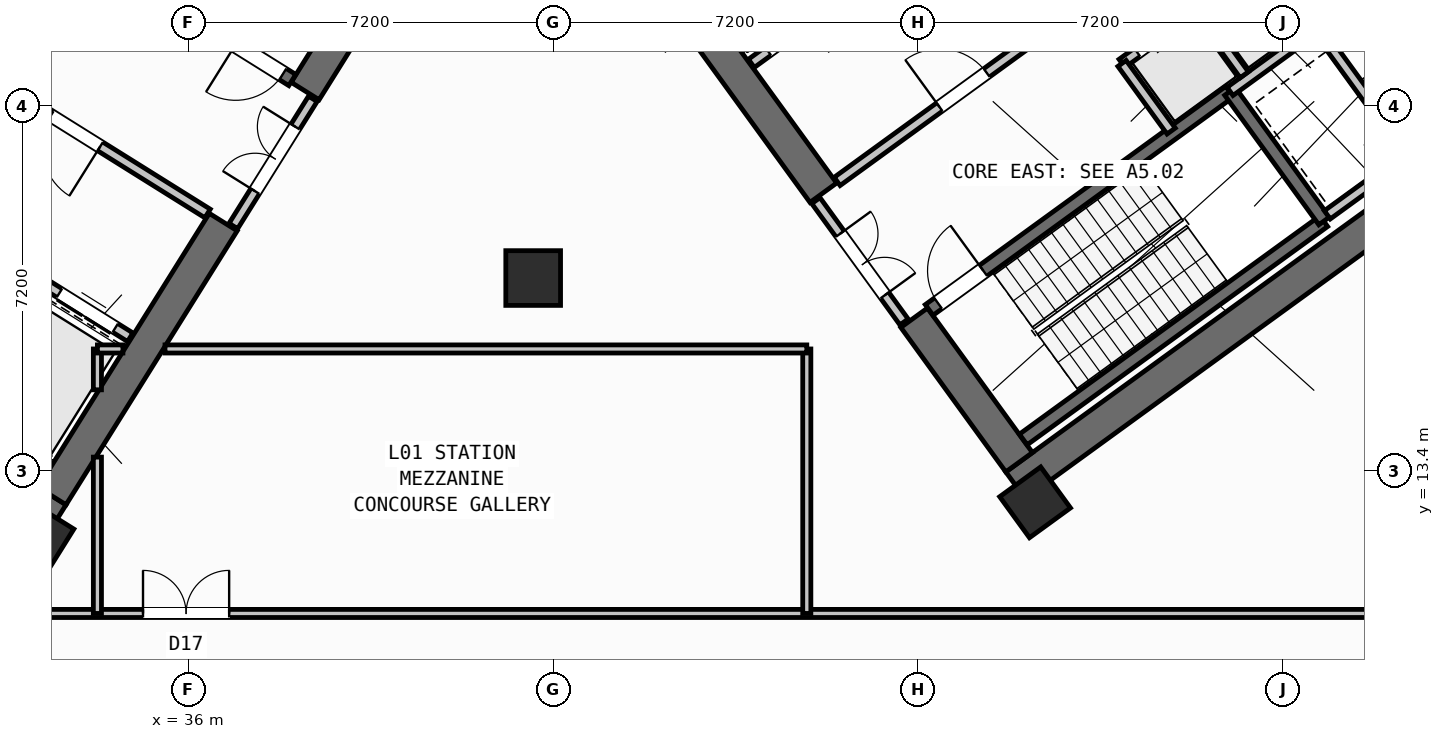
"""IFC4 building model, lengths in metres.
Left out: names, types, materials, properties, quantities, classifications, styles, units other than length and angle.
Written with IfcOpenShell. Run it as: python <this file> out.ifc"""

import sys

from ifc_helpers import new_model, si_unit, direction, frame, frame_2d, origin, origin_2d, place, context, subcontext, project, spatial, rectangle, hollow_rectangle, extrude, source, transform, mapped, element, fill, save


model = new_model("IFC4")
c1 = context("Model", 3, precision=1e-05, world=origin(), true_north=direction((0.0, 1.0)))
c2 = subcontext(c1, "Body", "Model", "MODEL_VIEW")
j1 = project(units=[si_unit("LENGTHUNIT", "METRE"), si_unit("PLANEANGLEUNIT", "RADIAN")], contexts=[c1])
p1 = place(None, origin())
s1 = spatial("IfcSite", under=j1, at=p1, CompositionType="ELEMENT")
p2 = place(p1, origin())
s2 = spatial("IfcBuilding", under=s1, at=p2, CompositionType="ELEMENT")
p3 = place(p2, frame((0.0, 0.0, 5.4)))
s3 = spatial("IfcBuildingStorey", under=s2, at=p3, CompositionType="ELEMENT", Elevation=5.4)
p4 = place(p3, frame((33.409, 12.45, 0.0), z_axis=(0.0, 0.0, 1.0), x_axis=(-0.848051132073, 0.529914405721, 0.0)))
e1 = element("IfcWall", 1, at=p4, inside=s3, PredefinedType="SHEAR", context=c2, shape_type="SweptSolid", body=[
    extrude(rectangle(XDim=13.24, YDim=0.65, at=frame_2d((6.62, 0.0))), origin(), (0.0, 0.0, 1.0), 4.45),
])
p5 = place(p3, frame((40.168, 23.88, 0.0), z_axis=(0.0, 0.0, 1.0), x_axis=(-0.529893103397, -0.8480644427, 0.0)))
e2 = element("IfcWall", 2, at=p5, inside=s3, PredefinedType="SHEAR", context=c2, shape_type="SweptSolid", body=[
    extrude(rectangle(XDim=3.525, YDim=0.65, at=frame_2d((1.763, 0.0))), origin(), (0.0, 0.0, 1.0), 4.45),
])
p6 = place(p3, frame((36.683, 18.304, 0.0), z_axis=(0.0, 0.0, 1.0), x_axis=(-0.529899109053, -0.848060690178, 0.0)))
e3 = element("IfcWall", 3, at=p6, inside=s3, PredefinedType="SHEAR", context=c2, shape_type="SweptSolid", body=[
    extrude(rectangle(XDim=6.375, YDim=0.65, at=frame_2d((3.188, 0.0))), origin(), (0.0, 0.0, 1.0), 4.45),
])
p7 = place(p3, frame((52.318, 13.11, 0.0), z_axis=(0.0, 0.0, 1.0), x_axis=(0.809019445368, 0.587781878776, 0.0)))
e4 = element("IfcWall", 4, at=p7, inside=s3, PredefinedType="SHEAR", context=c2, shape_type="SweptSolid", body=[
    extrude(rectangle(XDim=12.44, YDim=0.65, at=frame_2d((6.22, 0.0))), origin(), (0.0, 0.0, 1.0), 4.45),
])
p8 = place(p3, frame((52.39, 13.564, 0.0), z_axis=(0.0, 0.0, 1.0), x_axis=(-0.58779688989, 0.809008539037, 0.0)))
e5 = element("IfcWall", 5, at=p8, inside=s3, PredefinedType="SHEAR", context=c2, shape_type="SweptSolid", body=[
    extrude(rectangle(XDim=3.525, YDim=0.65, at=frame_2d((1.763, 0.0))), origin(), (0.0, 0.0, 1.0), 4.45),
])
p9 = place(p3, frame((48.526, 18.884, 0.0), z_axis=(0.0, 0.0, 1.0), x_axis=(-0.58777996584, 0.809020835181, 0.0)))
e6 = element("IfcWall", 6, at=p9, inside=s3, PredefinedType="SHEAR", context=c2, shape_type="SweptSolid", body=[
    extrude(rectangle(XDim=6.375, YDim=0.65, at=frame_2d((3.188, 0.0))), origin(), (0.0, 0.0, 1.0), 4.45),
])
m1 = source(origin(), c2, "Body", "SweptSolid", [
    extrude(hollow_rectangle(XDim=1.08, YDim=1.08, WallThickness=0.04, at=origin_2d()), origin(), (0.0, 0.0, 1.0), 4.8),
])
p10 = place(p3, frame((42.8, 17.2, 0.0), z_axis=(0.0, 0.0, 1.0), x_axis=(1.0, 0.0, 0.0)))
e7 = element("IfcColumn", 7, at=p10, inside=s3, PredefinedType="COLUMN", context=c2, shape_type="MappedRepresentation", body=[
    mapped(m1, transform((0.0, 0.0, 0.0), scale=1.0)),
])
m2 = source(origin(), c2, "Body", "SweptSolid", [
    extrude(hollow_rectangle(XDim=1.0, YDim=1.0, WallThickness=0.04, at=origin_2d()), origin(), (0.0, 0.0, 1.0), 4.8),
])
for number, where, z_axis, x_axis in (
    (8, (33.046, 12.087, 0.0), (0.0, 0.0, 1.0), (-0.848, 0.53, 0.0)),
    (9, (52.705, 12.773, 0.0), (0.0, 0.0, 1.0), (0.809, 0.588, 0.0)),
):
    element("IfcColumn", number, at=place(p3, frame(where, z_axis=z_axis, x_axis=x_axis)), inside=s3, PredefinedType="COLUMN", context=c2, shape_type="MappedRepresentation", body=[
        mapped(m2, transform((0.0, 0.0, 0.0), scale=1.0)),
    ])
p11 = place(p3, frame((38.046, 21.108, 0.0), z_axis=(0.0, 0.0, 1.0), x_axis=(-0.848054434086, 0.529909121291, 0.0)))
e10 = element("IfcWall", 10, at=p11, inside=s3, PredefinedType="SHEAR", context=c2, shape_type="SweptSolid", body=[
    extrude(rectangle(XDim=7.33, YDim=0.26, at=frame_2d((3.665, 0.0))), origin(), (0.0, 0.0, 1.0), 4.45),
])
p12 = place(p11, frame((0.22, 0.0, 0.0)))
e11 = element("IfcOpeningElement", 11, at=p12, cuts=e10, PredefinedType="OPENING", context=c2, shape_type="SweptSolid", body=[
    extrude(rectangle(XDim=1.1, YDim=2.1, at=frame_2d((0.55, 1.05))), frame((0.0, 0.14, 0.0), z_axis=(0.0, -1.0, 0.0), x_axis=(1.0, 0.0, 0.0)), (0.0, 0.0, 1.0), 0.28),
])
p13 = place(p3, frame((34.848, 16.031, 0.0), z_axis=(0.0, 0.0, 1.0), x_axis=(-0.848044042236, 0.529925751807, 0.0)))
e12 = element("IfcWall", 12, at=p13, inside=s3, PredefinedType="STANDARD", context=c2, shape_type="SweptSolid", body=[
    extrude(rectangle(XDim=4.198, YDim=0.2, at=frame_2d((2.099, 0.0))), origin(), (0.0, 0.0, 1.0), 4.44),
])
p14 = place(p13, frame((0.348, 0.0, 0.0)))
e13 = element("IfcOpeningElement", 13, at=p14, cuts=e12, PredefinedType="OPENING", context=c2, shape_type="SweptSolid", body=[
    extrude(rectangle(XDim=1.3, YDim=2.2, at=frame_2d((0.65, 1.1))), frame((0.0, 0.11, 0.0), z_axis=(0.0, -1.0, 0.0), x_axis=(1.0, 0.0, 0.0)), (0.0, 0.0, 1.0), 0.22),
])
p15 = place(p13, frame((2.423, 0.0, 0.0)))
e14 = element("IfcOpeningElement", 14, at=p15, cuts=e12, PredefinedType="OPENING", context=c2, shape_type="SweptSolid", body=[
    extrude(rectangle(XDim=1.45, YDim=2.25, at=frame_2d((0.725, 1.125))), frame((0.0, 0.11, 0.0), z_axis=(0.0, -1.0, 0.0), x_axis=(1.0, 0.0, 0.0)), (0.0, 0.0, 1.0), 0.22),
])
p16 = place(p3, frame((36.374, 18.474, 0.0), z_axis=(0.0, 0.0, 1.0), x_axis=(-0.848051071577, 0.529914502535, 0.0)))
e15 = element("IfcWall", 15, at=p16, inside=s3, PredefinedType="STANDARD", context=c2, shape_type="SweptSolid", body=[
    extrude(rectangle(XDim=5.718, YDim=0.2, at=frame_2d((2.859, 0.0))), origin(), (0.0, 0.0, 1.0), 4.44),
])
p17 = place(p16, frame((2.498, 0.0, 0.0)))
e16 = element("IfcOpeningElement", 16, at=p17, cuts=e15, PredefinedType="OPENING", context=c2, shape_type="SweptSolid", body=[
    extrude(rectangle(XDim=1.15, YDim=2.1, at=frame_2d((0.575, 1.05))), frame((0.0, 0.11, 0.0), z_axis=(0.0, -1.0, 0.0), x_axis=(1.0, 0.0, 0.0)), (0.0, 0.0, 1.0), 0.22),
])
p18 = place(p3, frame((52.472, 14.013, 0.0), z_axis=(0.0, 0.0, 1.0), x_axis=(0.809028366311, 0.587769599847, 0.0)))
e17 = element("IfcWall", 17, at=p18, inside=s3, PredefinedType="SHEAR", context=c2, shape_type="SweptSolid", body=[
    extrude(rectangle(XDim=7.33, YDim=0.26, at=frame_2d((3.665, 0.0))), origin(), (0.0, 0.0, 1.0), 4.45),
])
p19 = place(p3, frame((50.615, 16.57, 0.0), z_axis=(0.0, 0.0, 1.0), x_axis=(0.809028366311, 0.587769599847, 0.0)))
e18 = element("IfcWall", 18, at=p19, inside=s3, PredefinedType="SHEAR", context=c2, shape_type="SweptSolid", body=[
    extrude(rectangle(XDim=7.33, YDim=0.26, at=frame_2d((3.665, 0.0))), origin(), (0.0, 0.0, 1.0), 4.45),
])
p20 = place(p19, frame((0.22, 0.0, 0.0)))
e19 = element("IfcOpeningElement", 19, at=p20, cuts=e18, PredefinedType="OPENING", context=c2, shape_type="SweptSolid", body=[
    extrude(rectangle(XDim=1.1, YDim=2.1, at=frame_2d((0.55, 1.05))), frame((0.0, 0.14, 0.0), z_axis=(0.0, -1.0, 0.0), x_axis=(1.0, 0.0, 0.0)), (0.0, 0.0, 1.0), 0.28),
])
p21 = place(p3, frame((58.41, 18.327, 0.0), z_axis=(0.0, 0.0, 1.0), x_axis=(-0.58776738483, 0.809029975545, 0.0)))
e20 = element("IfcWall", 20, at=p21, inside=s3, PredefinedType="SHEAR", context=c2, shape_type="SweptSolid", body=[
    extrude(rectangle(XDim=3.16, YDim=0.26, at=frame_2d((1.58, 0.0))), origin(), (0.0, 0.0, 1.0), 4.45),
])
p22 = place(p3, frame((47.106, 21.437, 0.0), z_axis=(0.0, 0.0, 1.0), x_axis=(0.809012514015, 0.58779141893, 0.0)))
e21 = element("IfcWall", 21, at=p22, inside=s3, PredefinedType="STANDARD", context=c2, shape_type="SweptSolid", body=[
    extrude(rectangle(XDim=3.398, YDim=0.2, at=frame_2d((1.699, 0.0))), origin(), (0.0, 0.0, 1.0), 4.44),
])
p23 = place(p22, frame((0.408, 0.0, 0.0)))
e22 = element("IfcOpeningElement", 22, at=p23, cuts=e21, PredefinedType="OPENING", context=c2, shape_type="SweptSolid", body=[
    extrude(rectangle(XDim=1.3, YDim=2.2, at=frame_2d((0.65, 1.1))), frame((0.0, 0.11, 0.0), z_axis=(0.0, -1.0, 0.0), x_axis=(1.0, 0.0, 0.0)), (0.0, 0.0, 1.0), 0.22),
])
p24 = place(p3, frame((48.799, 19.107, 0.0), z_axis=(0.0, 0.0, 1.0), x_axis=(0.809012959416, 0.587790805897, 0.0)))
e23 = element("IfcWall", 23, at=p24, inside=s3, PredefinedType="STANDARD", context=c2, shape_type="SweptSolid", body=[
    extrude(rectangle(XDim=5.718, YDim=0.2, at=frame_2d((2.859, 0.0))), origin(), (0.0, 0.0, 1.0), 4.44),
])
p25 = place(p24, frame((2.498, 0.0, 0.0)))
e24 = element("IfcOpeningElement", 24, at=p25, cuts=e23, PredefinedType="OPENING", context=c2, shape_type="SweptSolid", body=[
    extrude(rectangle(XDim=1.15, YDim=2.1, at=frame_2d((0.575, 1.05))), frame((0.0, 0.11, 0.0), z_axis=(0.0, -1.0, 0.0), x_axis=(1.0, 0.0, 0.0)), (0.0, 0.0, 1.0), 0.22),
])
p26 = place(p3, frame((56.553, 20.884, 0.0), z_axis=(0.0, 0.0, 1.0), x_axis=(0.809035789462, 0.587759382205, 0.0)))
e25 = element("IfcWall", 25, at=p26, inside=s3, PredefinedType="STANDARD", context=c2, shape_type="SweptSolid", body=[
    extrude(rectangle(XDim=3.768, YDim=0.2, at=frame_2d((1.884, 0.0))), origin(), (0.0, 0.0, 1.0), 4.44),
])
p27 = place(p26, frame((2.65, 0.0, 0.0)))
e26 = element("IfcOpeningElement", 26, at=p27, cuts=e25, PredefinedType="OPENING", context=c2, shape_type="SweptSolid", body=[
    extrude(rectangle(XDim=0.86, YDim=2.05, at=frame_2d((0.43, 1.025))), frame((0.0, 0.11, 0.0), z_axis=(0.0, -1.0, 0.0), x_axis=(1.0, 0.0, 0.0)), (0.0, 0.0, 1.0), 0.22),
])
p28 = place(p3, frame((54.421, 21.436, 0.0), z_axis=(0.0, 0.0, 1.0), x_axis=(0.809013710463, 0.587789772183, 0.0)))
e27 = element("IfcWall", 27, at=p28, inside=s3, PredefinedType="STANDARD", context=c2, shape_type="SweptSolid", body=[
    extrude(rectangle(XDim=5.36, YDim=0.2, at=frame_2d((2.68, 0.0))), origin(), (0.0, 0.0, 1.0), 4.44),
])
p29 = place(p28, frame((0.37, 0.0, 0.0)))
e28 = element("IfcOpeningElement", 28, at=p29, cuts=e27, PredefinedType="OPENING", context=c2, shape_type="SweptSolid", body=[
    extrude(rectangle(XDim=1.1, YDim=2.15, at=frame_2d((0.55, 1.075))), frame((0.0, 0.11, 0.0), z_axis=(0.0, -1.0, 0.0), x_axis=(1.0, 0.0, 0.0)), (0.0, 0.0, 1.0), 0.22),
])
p30 = place(p28, frame((2.17, 0.0, 0.0)))
e29 = element("IfcOpeningElement", 29, at=p30, cuts=e27, PredefinedType="OPENING", context=c2, shape_type="SweptSolid", body=[
    extrude(rectangle(XDim=1.1, YDim=2.15, at=frame_2d((0.55, 1.075))), frame((0.0, 0.11, 0.0), z_axis=(0.0, -1.0, 0.0), x_axis=(1.0, 0.0, 0.0)), (0.0, 0.0, 1.0), 0.22),
])
p31 = place(p28, frame((3.97, 0.0, 0.0)))
e30 = element("IfcOpeningElement", 30, at=p31, cuts=e27, PredefinedType="OPENING", context=c2, shape_type="SweptSolid", body=[
    extrude(rectangle(XDim=1.1, YDim=2.15, at=frame_2d((0.55, 1.075))), frame((0.0, 0.11, 0.0), z_axis=(0.0, -1.0, 0.0), x_axis=(1.0, 0.0, 0.0)), (0.0, 0.0, 1.0), 0.22),
])
p32 = place(p3, frame((55.391, 20.102, 0.0), z_axis=(0.0, 0.0, 1.0), x_axis=(-0.58778447739, 0.809017557374, 0.0)))
e31 = element("IfcWall", 31, at=p32, inside=s3, PredefinedType="STANDARD", context=c2, shape_type="SweptSolid", body=[
    extrude(rectangle(XDim=1.65, YDim=0.2, at=frame_2d((0.825, 0.0))), origin(), (0.0, 0.0, 1.0), 4.44),
])
p33 = place(p3, frame((56.834, 21.212, 0.0), z_axis=(0.0, 0.0, 1.0), x_axis=(-0.58776738483, 0.809029975545, 0.0)))
e32 = element("IfcWall", 32, at=p33, inside=s3, PredefinedType="STANDARD", context=c2, shape_type="SweptSolid", body=[
    extrude(rectangle(XDim=1.58, YDim=0.2, at=frame_2d((0.79, 0.0))), origin(), (0.0, 0.0, 1.0), 4.44),
])
p34 = place(p3, frame((60.067, 19.655, 0.0), z_axis=(0.0, 0.0, 1.0), x_axis=(-0.587800520745, 0.809005900975, 0.0)))
e33 = element("IfcWall", 33, at=p34, inside=s3, PredefinedType="STANDARD", context=c2, shape_type="SweptSolid", body=[
    extrude(rectangle(XDim=2.66, YDim=0.2, at=frame_2d((1.33, 0.0))), origin(), (0.0, 0.0, 1.0), 4.44),
])
p35 = place(p3, frame((58.472, 18.447, 0.0), z_axis=(0.0, 0.0, 1.0), x_axis=(0.809022487728, 0.587777691266, 0.0)))
e34 = element("IfcWall", 34, at=p35, inside=s3, PredefinedType="STANDARD", context=c2, shape_type="SweptSolid", body=[
    extrude(rectangle(XDim=3.648, YDim=0.2, at=frame_2d((1.824, 0.0))), origin(), (0.0, 0.0, 1.0), 4.44),
])
p36 = place(p3, frame((38.451, 20.737, 0.0), z_axis=(0.0, 0.0, 1.0), x_axis=(-0.529924799939, -0.848044637038, 0.0)))
e35 = element("IfcWall", 35, at=p36, inside=s3, PredefinedType="STANDARD", context=c2, shape_type="SweptSolid", body=[
    extrude(rectangle(XDim=2.96, YDim=0.2, at=frame_2d((1.48, 0.0))), origin(), (0.0, 0.0, 1.0), 4.44),
])
p37 = place(p36, frame((0.65, 0.0, 0.0)))
e36 = element("IfcOpeningElement", 36, at=p37, cuts=e35, PredefinedType="OPENING", context=c2, shape_type="SweptSolid", body=[
    extrude(rectangle(XDim=1.5, YDim=2.15, at=frame_2d((0.75, 1.075))), frame((0.0, 0.11, 0.0), z_axis=(0.0, -1.0, 0.0), x_axis=(1.0, 0.0, 0.0)), (0.0, 0.0, 1.0), 0.22),
])
p38 = place(p3, frame((50.119, 16.333, 0.0), z_axis=(0.0, 0.0, 1.0), x_axis=(-0.587749856981, 0.809042709391, 0.0)))
e37 = element("IfcWall", 37, at=p38, inside=s3, PredefinedType="STANDARD", context=c2, shape_type="SweptSolid", body=[
    extrude(rectangle(XDim=2.96, YDim=0.2, at=frame_2d((1.48, 0.0))), origin(), (0.0, 0.0, 1.0), 4.44),
])
p39 = place(p38, frame((0.65, 0.0, 0.0)))
e38 = element("IfcOpeningElement", 38, at=p39, cuts=e37, PredefinedType="OPENING", context=c2, shape_type="SweptSolid", body=[
    extrude(rectangle(XDim=1.5, YDim=2.15, at=frame_2d((0.75, 1.075))), frame((0.0, 0.11, 0.0), z_axis=(0.0, -1.0, 0.0), x_axis=(1.0, 0.0, 0.0)), (0.0, 0.0, 1.0), 0.22),
])
p40 = place(p3, frame((6.1, 10.58, 0.0), z_axis=(0.0, 0.0, 1.0), x_axis=(1.0, 0.0, 0.0)))
e39 = element("IfcWall", 39, at=p40, inside=s3, PredefinedType="PARTITIONING", context=c2, shape_type="SweptSolid", body=[
    extrude(rectangle(XDim=62.1, YDim=0.16, at=frame_2d((31.05, 0.0))), origin(), (0.0, 0.0, 1.0), 4.44),
])
p41 = place(p40, frame((29.0, 0.0, 0.0)))
e40 = element("IfcOpeningElement", 40, at=p41, cuts=e39, PredefinedType="OPENING", context=c2, shape_type="SweptSolid", body=[
    extrude(rectangle(XDim=1.7, YDim=2.2, at=frame_2d((0.85, 1.1))), frame((0.0, 0.09, 0.0), z_axis=(0.0, -1.0, 0.0), x_axis=(1.0, 0.0, 0.0)), (0.0, 0.0, 1.0), 0.18),
])
p42 = place(p40, frame((0.35, 0.0, 0.0)))
e41 = element("IfcOpeningElement", 41, at=p42, cuts=e39, PredefinedType="OPENING", context=c2, shape_type="SweptSolid", body=[
    extrude(rectangle(XDim=1.5, YDim=2.15, at=frame_2d((0.75, 1.075))), frame((0.0, 0.09, 0.0), z_axis=(0.0, -1.0, 0.0), x_axis=(1.0, 0.0, 0.0)), (0.0, 0.0, 1.0), 0.18),
])
p43 = place(p40, frame((5.2, 0.0, 0.0)))
e42 = element("IfcOpeningElement", 42, at=p43, cuts=e39, PredefinedType="OPENING", context=c2, shape_type="SweptSolid", body=[
    extrude(rectangle(XDim=1.08, YDim=2.15, at=frame_2d((0.54, 1.075))), frame((0.0, 0.09, 0.0), z_axis=(0.0, -1.0, 0.0), x_axis=(1.0, 0.0, 0.0)), (0.0, 0.0, 1.0), 0.18),
])
p44 = place(p40, frame((58.5, 0.0, 0.0)))
e43 = element("IfcOpeningElement", 43, at=p44, cuts=e39, PredefinedType="OPENING", context=c2, shape_type="SweptSolid", body=[
    extrude(rectangle(XDim=1.08, YDim=2.15, at=frame_2d((0.54, 1.075))), frame((0.0, 0.09, 0.0), z_axis=(0.0, -1.0, 0.0), x_axis=(1.0, 0.0, 0.0)), (0.0, 0.0, 1.0), 0.18),
])
p45 = place(p3, frame((34.2, 10.58, 0.0), z_axis=(0.0, 0.0, 1.0), x_axis=(0.0, 1.0, 0.0)))
e44 = element("IfcWall", 44, at=p45, inside=s3, PredefinedType="PARTITIONING", context=c2, shape_type="SweptSolid", body=[
    extrude(rectangle(XDim=3.085, YDim=0.16, at=frame_2d((1.543, 0.0))), origin(), (0.0, 0.0, 1.0), 4.44),
])
p46 = place(p3, frame((34.2, 14.994, 0.0), z_axis=(0.0, 0.0, 1.0), x_axis=(0.0, 1.0, 0.0)))
e45 = element("IfcWall", 45, at=p46, inside=s3, PredefinedType="PARTITIONING", context=c2, shape_type="SweptSolid", body=[
    extrude(rectangle(XDim=0.806, YDim=0.16, at=frame_2d((0.403, 0.0))), origin(), (0.0, 0.0, 1.0), 4.44),
])
p47 = place(p3, frame((48.2, 10.58, 0.0), z_axis=(0.0, 0.0, 1.0), x_axis=(0.0, 1.0, 0.0)))
e46 = element("IfcWall", 46, at=p47, inside=s3, PredefinedType="PARTITIONING", context=c2, shape_type="SweptSolid", body=[
    extrude(rectangle(XDim=5.22, YDim=0.16, at=frame_2d((2.61, 0.0))), origin(), (0.0, 0.0, 1.0), 4.44),
])
p48 = place(p3, frame((34.2, 15.8, 0.0), z_axis=(0.0, 0.0, 1.0), x_axis=(1.0, 0.0, 0.0)))
e47 = element("IfcWall", 47, at=p48, inside=s3, PredefinedType="PARTITIONING", context=c2, shape_type="SweptSolid", body=[
    extrude(rectangle(XDim=0.504, YDim=0.16, at=frame_2d((0.252, 0.0))), origin(), (0.0, 0.0, 1.0), 4.44),
])
p49 = place(p3, frame((35.534, 15.8, 0.0), z_axis=(0.0, 0.0, 1.0), x_axis=(1.0, 0.0, 0.0)))
e48 = element("IfcWall", 48, at=p49, inside=s3, PredefinedType="PARTITIONING", context=c2, shape_type="SweptSolid", body=[
    extrude(rectangle(XDim=12.666, YDim=0.16, at=frame_2d((6.333, 0.0))), origin(), (0.0, 0.0, 1.0), 4.44),
])
m3 = source(origin(), c2, "Body", "SweptSolid", [
    extrude(rectangle(XDim=1.1, YDim=2.1, at=frame_2d((0.55, 1.05))), frame((0.0, 0.025, 0.0), z_axis=(0.0, -1.0, 0.0), x_axis=(1.0, 0.0, 0.0)), (0.0, 0.0, 1.0), 0.05),
])
p50 = place(p12, origin())
e49 = element("IfcDoor", 49, at=p50, inside=s3, OperationType="SINGLE_SWING_RIGHT", PredefinedType="DOOR", context=c2, shape_type="MappedRepresentation", body=[
    mapped(m3, transform((0.0, 0.0, 0.0), scale=1.0)),
])
fill(e11, e49)
m4 = source(origin(), c2, "Body", "SweptSolid", [
    extrude(rectangle(XDim=1.15, YDim=2.1, at=frame_2d((0.575, 1.05))), frame((0.0, 0.025, 0.0), z_axis=(0.0, -1.0, 0.0), x_axis=(1.0, 0.0, 0.0)), (0.0, 0.0, 1.0), 0.05),
])
p51 = place(p17, origin())
e50 = element("IfcDoor", 50, at=p51, inside=s3, OperationType="SINGLE_SWING_LEFT", PredefinedType="DOOR", context=c2, shape_type="MappedRepresentation", body=[
    mapped(m4, transform((0.0, 0.0, 0.0), scale=1.0)),
])
fill(e16, e50)
m5 = source(origin(), c2, "Body", "SweptSolid", [
    extrude(rectangle(XDim=1.3, YDim=2.2, at=frame_2d((0.65, 1.1))), frame((0.0, 0.025, 0.0), z_axis=(0.0, -1.0, 0.0), x_axis=(1.0, 0.0, 0.0)), (0.0, 0.0, 1.0), 0.05),
])
p52 = place(p14, origin())
e51 = element("IfcDoor", 51, at=p52, inside=s3, OperationType="DOUBLE_DOOR_SLIDING", PredefinedType="DOOR", context=c2, shape_type="MappedRepresentation", body=[
    mapped(m5, transform((0.0, 0.0, 0.0), scale=1.0)),
])
fill(e13, e51)
p53 = place(p20, origin())
e52 = element("IfcDoor", 52, at=p53, inside=s3, OperationType="SINGLE_SWING_RIGHT", PredefinedType="DOOR", context=c2, shape_type="MappedRepresentation", body=[
    mapped(m3, transform((0.0, 0.0, 0.0), scale=1.0)),
])
fill(e19, e52)
p54 = place(p25, origin())
e53 = element("IfcDoor", 53, at=p54, inside=s3, OperationType="SINGLE_SWING_LEFT", PredefinedType="DOOR", context=c2, shape_type="MappedRepresentation", body=[
    mapped(m4, transform((0.0, 0.0, 0.0), scale=1.0)),
])
fill(e24, e53)
p55 = place(p23, origin())
e54 = element("IfcDoor", 54, at=p55, inside=s3, OperationType="DOUBLE_DOOR_SLIDING", PredefinedType="DOOR", context=c2, shape_type="MappedRepresentation", body=[
    mapped(m5, transform((0.0, 0.0, 0.0), scale=1.0)),
])
fill(e22, e54)
m6 = source(origin(), c2, "Body", "SweptSolid", [
    extrude(rectangle(XDim=1.1, YDim=2.15, at=frame_2d((0.55, 1.075))), frame((0.0, 0.025, 0.0), z_axis=(0.0, -1.0, 0.0), x_axis=(1.0, 0.0, 0.0)), (0.0, 0.0, 1.0), 0.05),
])
p56 = place(p29, origin())
e55 = element("IfcDoor", 55, at=p56, inside=s3, OperationType="DOUBLE_DOOR_SLIDING", PredefinedType="DOOR", context=c2, shape_type="MappedRepresentation", body=[
    mapped(m6, transform((0.0, 0.0, 0.0), scale=1.0)),
])
fill(e28, e55)
m7 = source(origin(), c2, "Body", "SweptSolid", [
    extrude(rectangle(XDim=1.7, YDim=2.2, at=frame_2d((0.85, 1.1))), frame((0.0, 0.025, 0.0), z_axis=(0.0, -1.0, 0.0), x_axis=(1.0, 0.0, 0.0)), (0.0, 0.0, 1.0), 0.05),
])
p57 = place(p41, origin())
e56 = element("IfcDoor", 56, at=p57, inside=s3, OperationType="DOUBLE_DOOR_SINGLE_SWING", PredefinedType="DOOR", context=c2, shape_type="MappedRepresentation", body=[
    mapped(m7, transform((0.0, 0.0, 0.0), scale=1.0)),
])
fill(e40, e56)
m8 = source(origin(), c2, "Body", "SweptSolid", [
    extrude(rectangle(XDim=1.5, YDim=2.15, at=frame_2d((0.75, 1.075))), frame((0.0, 0.025, 0.0), z_axis=(0.0, -1.0, 0.0), x_axis=(1.0, 0.0, 0.0)), (0.0, 0.0, 1.0), 0.05),
])
p58 = place(p37, frame((1.5, 0.0, 0.0), z_axis=(0.0, 0.0, 1.0), x_axis=(-1.0, 0.0, 0.0)))
e57 = element("IfcDoor", 57, at=p58, inside=s3, OperationType="DOUBLE_DOOR_SINGLE_SWING", PredefinedType="DOOR", context=c2, shape_type="MappedRepresentation", body=[
    mapped(m8, transform((0.0, 0.0, 0.0), scale=1.0)),
])
fill(e36, e57)
p59 = place(p39, frame((1.5, 0.0, 0.0), z_axis=(0.0, 0.0, 1.0), x_axis=(-1.0, 0.0, 0.0)))
e58 = element("IfcDoor", 58, at=p59, inside=s3, OperationType="DOUBLE_DOOR_SINGLE_SWING", PredefinedType="DOOR", context=c2, shape_type="MappedRepresentation", body=[
    mapped(m8, transform((0.0, 0.0, 0.0), scale=1.0)),
])
fill(e38, e58)
save(model, sys.argv[1])
